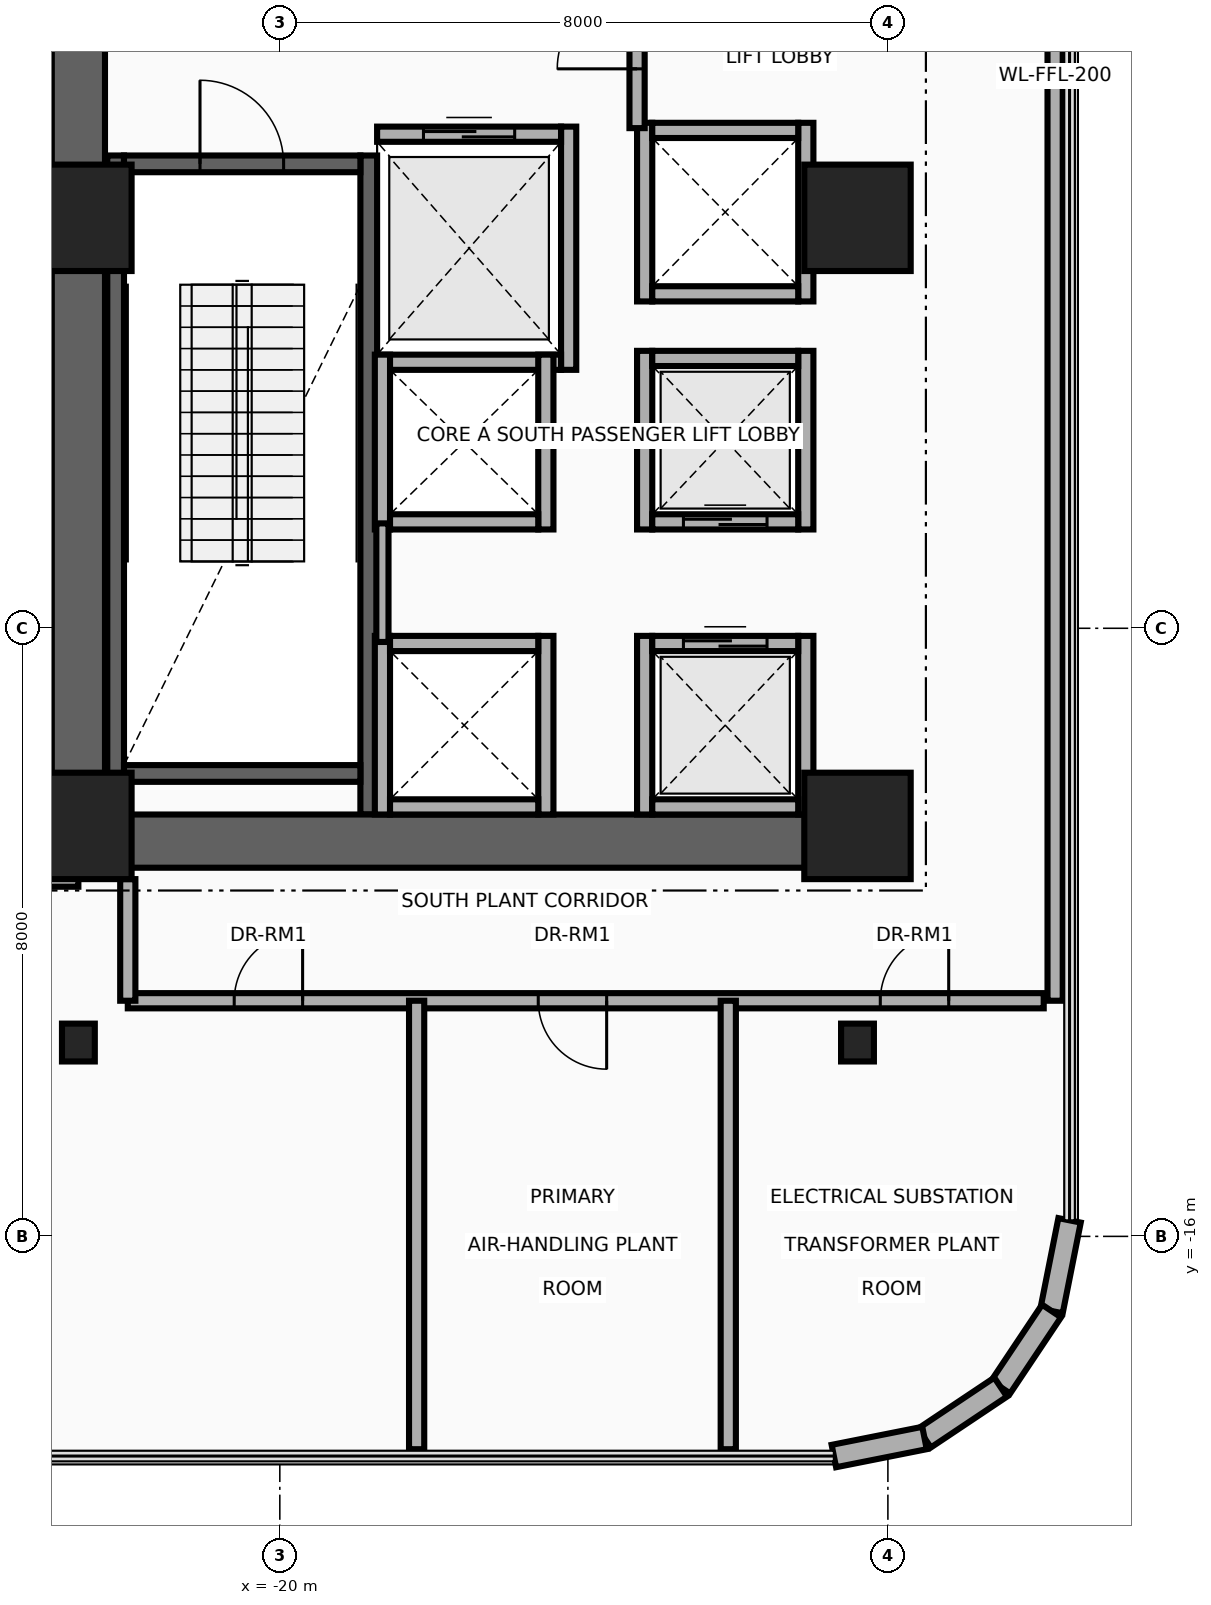
"""IFC4 building model, lengths in metres.
Left out: names, types, materials, properties, quantities, classifications, styles, units other than length and angle.
Written with IfcOpenShell. Run it as: python <this file> out.ifc"""

import sys

from ifc_helpers import new_model, si_unit, direction, frame, frame_2d, origin, origin_2d, place, context, subcontext, project, spatial, rectangle, i_section, extrude, source, transform, mapped, element, fill, save


model = new_model("IFC4")
c1 = context("Model", 3, precision=1e-05, world=origin(), true_north=direction((0.0, 1.0)))
c2 = subcontext(c1, "Body", "Model", "MODEL_VIEW")
j1 = project(units=[si_unit("LENGTHUNIT", "METRE"), si_unit("PLANEANGLEUNIT", "RADIAN")], contexts=[c1])
p1 = place(None, origin())
s1 = spatial("IfcSite", under=j1, at=p1, CompositionType="ELEMENT")
p2 = place(p1, origin())
s2 = spatial("IfcBuilding", under=s1, at=p2, CompositionType="ELEMENT")
p3 = place(p2, frame((0.0, 0.0, 96.3)))
s3 = spatial("IfcBuildingStorey", under=s2, at=p3, CompositionType="ELEMENT", Elevation=96.3)
for number, where, z_axis, x_axis in (
    (1, (-22.16, -10.45, 0.0), (0.0, 0.0, 1.0), (0.0, 1.0, 0.0)),
    (2, (-18.83, -10.45, 0.0), (0.0, 0.0, 1.0), (0.0, 1.0, 0.0)),
):
    element("IfcWall", number, at=place(p3, frame(where, z_axis=z_axis, x_axis=x_axis)), inside=s3, PredefinedType="SHEAR", context=c2, shape_type="SweptSolid", body=[
        extrude(rectangle(XDim=8.67, YDim=0.22, at=frame_2d((4.335, 0.0))), origin(), (0.0, 0.0, 1.0), 4.56),
    ])
p4 = place(p3, frame((-22.05, -9.91, 0.0), z_axis=(0.0, 0.0, 1.0), x_axis=(1.0, 0.0, 0.0)))
e3 = element("IfcWall", 3, at=p4, inside=s3, PredefinedType="SHEAR", context=c2, shape_type="SweptSolid", body=[
    extrude(rectangle(XDim=3.11, YDim=0.22, at=frame_2d((1.555, 0.0))), origin(), (0.0, 0.0, 1.0), 4.56),
])
p5 = place(p3, frame((-22.05, -1.89, 0.0), z_axis=(0.0, 0.0, 1.0), x_axis=(1.0, 0.0, 0.0)))
e4 = element("IfcWall", 4, at=p5, inside=s3, PredefinedType="SHEAR", context=c2, shape_type="SweptSolid", body=[
    extrude(rectangle(XDim=3.11, YDim=0.22, at=frame_2d((1.555, 0.0))), origin(), (0.0, 0.0, 1.0), 4.56),
])
p6 = place(p5, frame((1.0, 0.0, 0.0)))
e5 = element("IfcOpeningElement", 5, at=p6, cuts=e4, PredefinedType="OPENING", context=c2, shape_type="SweptSolid", body=[
    extrude(rectangle(XDim=1.1, YDim=2.15, at=frame_2d((0.55, 1.075))), frame((0.0, 0.125, 0.0), z_axis=(0.0, -1.0, 0.0), x_axis=(1.0, 0.0, 0.0)), (0.0, 0.0, 1.0), 0.25),
])
p7 = place(p3, frame((-22.65, -11.15, 0.0), z_axis=(0.0, 0.0, 1.0), x_axis=(0.0, 1.0, 0.0)))
e6 = element("IfcWall", 6, at=p7, inside=s3, PredefinedType="SHEAR", context=c2, shape_type="SweptSolid", body=[
    extrude(rectangle(XDim=22.3, YDim=0.7, at=frame_2d((11.15, 0.0))), origin(), (0.0, 0.0, 1.0), 4.56),
])
p8 = place(p3, frame((-22.65, -10.8, 0.0), z_axis=(0.0, 0.0, 1.0), x_axis=(1.0, 0.0, 0.0)))
e7 = element("IfcWall", 7, at=p8, inside=s3, PredefinedType="SHEAR", context=c2, shape_type="SweptSolid", body=[
    extrude(rectangle(XDim=10.25, YDim=0.7, at=frame_2d((5.125, 0.0))), origin(), (0.0, 0.0, 1.0), 4.56),
])
m1 = source(origin(), c2, "Body", "SweptSolid", [
    extrude(rectangle(XDim=1.4, YDim=1.4, at=origin_2d()), origin(), (0.0, 0.0, 1.0), 4.8),
])
for number, where, z_axis, x_axis in (
    (8, (-22.65, -10.6, 0.0), (0.0, 0.0, 1.0), (1.0, 0.0, 0.0)),
    (9, (-12.4, -10.6, 0.0), (0.0, 0.0, 1.0), (1.0, 0.0, 0.0)),
    (10, (-22.65, -2.6, 0.0), (0.0, 0.0, 1.0), (1.0, 0.0, 0.0)),
    (11, (-12.4, -2.6, 0.0), (0.0, 0.0, 1.0), (1.0, 0.0, 0.0)),
):
    element("IfcColumn", number, at=place(p3, frame(where, z_axis=z_axis, x_axis=x_axis)), inside=s3, PredefinedType="COLUMN", context=c2, shape_type="MappedRepresentation", body=[
        mapped(m1, transform((0.0, 0.0, 0.0), x_axis=(1.0, 0.0, 0.0), y_axis=(0.0, 1.0, 0.0), z_axis=(0.0, 0.0, 1.0), scale=1.0)),
    ])
m2 = source(origin(), c2, "Body", "SweptSolid", [
    extrude(i_section(OverallWidth=0.432, OverallDepth=0.498, WebThickness=0.056, FlangeThickness=0.089, at=origin_2d()), origin(), (0.0, 0.0, 1.0), 4.8),
])
for number, where, z_axis, x_axis in (
    (12, (-22.65, -13.45, 0.0), (0.0, 0.0, 1.0), (1.0, 0.0, 0.0)),
    (13, (-12.4, -13.45, 0.0), (0.0, 0.0, 1.0), (1.0, 0.0, 0.0)),
):
    element("IfcColumn", number, at=place(p3, frame(where, z_axis=z_axis, x_axis=x_axis)), inside=s3, PredefinedType="COLUMN", context=c2, shape_type="MappedRepresentation", body=[
        mapped(m2, transform((0.0, 0.0, 0.0), x_axis=(1.0, 0.0, 0.0), y_axis=(0.0, 1.0, 0.0), z_axis=(0.0, 0.0, 1.0), scale=1.0)),
    ])
p9 = place(p3, frame((-9.61, -15.789, 0.0), z_axis=(0.0, 0.0, 1.0), x_axis=(-0.194996050505, -0.980804027463, 0.0)))
e14 = element("IfcWall", 14, at=p9, inside=s3, PredefinedType="SOLIDWALL", context=c2, shape_type="SweptSolid", body=[
    extrude(rectangle(XDim=1.216, YDim=0.3, at=frame_2d((0.608, 0.0))), origin(), (0.0, 0.0, 1.0), 4.56),
])
for number, where, z_axis, x_axis in (
    (15, (-9.847, -16.982, 0.0), (0.0, 0.0, 1.0), (-0.556, -0.831, 0.0)),
    (16, (-10.517, -17.983, 0.0), (0.0, 0.0, 1.0), (-0.831, -0.556, 0.0)),
):
    element("IfcWall", number, at=place(p3, frame(where, z_axis=z_axis, x_axis=x_axis)), inside=s3, PredefinedType="SOLIDWALL", context=c2, shape_type="SweptSolid", body=[
        extrude(rectangle(XDim=1.205, YDim=0.3, at=frame_2d((0.603, 0.0))), origin(), (0.0, 0.0, 1.0), 4.56),
    ])
p10 = place(p3, frame((-11.518, -18.653, 0.0), z_axis=(0.0, 0.0, 1.0), x_axis=(-0.980804027463, -0.194996050505, 0.0)))
e17 = element("IfcWall", 17, at=p10, inside=s3, PredefinedType="SOLIDWALL", context=c2, shape_type="SweptSolid", body=[
    extrude(rectangle(XDim=1.216, YDim=0.3, at=frame_2d((0.608, 0.0))), origin(), (0.0, 0.0, 1.0), 4.56),
])
p11 = place(p3, frame((-16.2, -4.6, 0.0), z_axis=(0.0, 0.0, 1.0), x_axis=(0.0, 1.0, 0.0)))
e18 = element("IfcWall", 18, at=p11, inside=s3, PredefinedType="MOVABLE", context=c2, shape_type="SweptSolid", body=[
    extrude(rectangle(XDim=3.2, YDim=0.2, at=frame_2d((1.6, 0.0))), origin(), (0.0, 0.0, 1.0), 4.56),
])
p12 = place(p3, frame((-18.72, -4.5, 0.0), z_axis=(0.0, 0.0, 1.0), x_axis=(1.0, 0.0, 0.0)))
e19 = element("IfcWall", 19, at=p12, inside=s3, PredefinedType="MOVABLE", context=c2, shape_type="SweptSolid", body=[
    extrude(rectangle(XDim=2.42, YDim=0.2, at=frame_2d((1.21, 0.0))), origin(), (0.0, 0.0, 1.0), 4.56),
])
p13 = place(p3, frame((-18.72, -1.5, 0.0), z_axis=(0.0, 0.0, 1.0), x_axis=(1.0, 0.0, 0.0)))
e20 = element("IfcWall", 20, at=p13, inside=s3, PredefinedType="MOVABLE", context=c2, shape_type="SweptSolid", body=[
    extrude(rectangle(XDim=2.42, YDim=0.2, at=frame_2d((1.21, 0.0))), origin(), (0.0, 0.0, 1.0), 4.56),
])
p14 = place(p13, frame((0.61, 0.0, 0.0)))
e21 = element("IfcOpeningElement", 21, at=p14, cuts=e20, PredefinedType="OPENING", context=c2, shape_type="SweptSolid", body=[
    extrude(rectangle(XDim=1.2, YDim=2.1, at=frame_2d((0.6, 1.05))), frame((0.0, 0.115, 0.0), z_axis=(0.0, -1.0, 0.0), x_axis=(1.0, 0.0, 0.0)), (0.0, 0.0, 1.0), 0.23),
])
for number, where, z_axis, x_axis in (
    (22, (-15.2, -10.45, 0.0), (0.0, 0.0, 1.0), (0.0, 1.0, 0.0)),
    (23, (-13.08, -10.45, 0.0), (0.0, 0.0, 1.0), (0.0, 1.0, 0.0)),
):
    element("IfcWall", number, at=place(p3, frame(where, z_axis=z_axis, x_axis=x_axis)), inside=s3, PredefinedType="MOVABLE", context=c2, shape_type="SweptSolid", body=[
        extrude(rectangle(XDim=2.35, YDim=0.2, at=frame_2d((1.175, 0.0))), origin(), (0.0, 0.0, 1.0), 3.766),
    ])
p15 = place(p3, frame((-15.1, -10.35, 0.0), z_axis=(0.0, 0.0, 1.0), x_axis=(1.0, 0.0, 0.0)))
e24 = element("IfcWall", 24, at=p15, inside=s3, PredefinedType="MOVABLE", context=c2, shape_type="SweptSolid", body=[
    extrude(rectangle(XDim=1.92, YDim=0.2, at=frame_2d((0.96, 0.0))), origin(), (0.0, 0.0, 1.0), 3.766),
])
p16 = place(p3, frame((-15.1, -8.2, 0.0), z_axis=(0.0, 0.0, 1.0), x_axis=(1.0, 0.0, 0.0)))
e25 = element("IfcWall", 25, at=p16, inside=s3, PredefinedType="MOVABLE", context=c2, shape_type="SweptSolid", body=[
    extrude(rectangle(XDim=1.92, YDim=0.2, at=frame_2d((0.96, 0.0))), origin(), (0.0, 0.0, 1.0), 4.56),
])
p17 = place(p16, frame((0.41, 0.0, 0.0)))
e26 = element("IfcOpeningElement", 26, at=p17, cuts=e25, PredefinedType="OPENING", context=c2, shape_type="SweptSolid", body=[
    extrude(rectangle(XDim=1.1, YDim=2.1, at=frame_2d((0.55, 1.05))), frame((0.0, 0.115, 0.0), z_axis=(0.0, -1.0, 0.0), x_axis=(1.0, 0.0, 0.0)), (0.0, 0.0, 1.0), 0.23),
])
for number, where, z_axis, x_axis in (
    (27, (-15.2, -6.7, 0.0), (0.0, 0.0, 1.0), (0.0, 1.0, 0.0)),
    (28, (-13.08, -6.7, 0.0), (0.0, 0.0, 1.0), (0.0, 1.0, 0.0)),
):
    element("IfcWall", number, at=place(p3, frame(where, z_axis=z_axis, x_axis=x_axis)), inside=s3, PredefinedType="MOVABLE", context=c2, shape_type="SweptSolid", body=[
        extrude(rectangle(XDim=2.35, YDim=0.2, at=frame_2d((1.175, 0.0))), origin(), (0.0, 0.0, 1.0), 4.56),
    ])
p18 = place(p3, frame((-15.1, -6.6, 0.0), z_axis=(0.0, 0.0, 1.0), x_axis=(1.0, 0.0, 0.0)))
e29 = element("IfcWall", 29, at=p18, inside=s3, PredefinedType="MOVABLE", context=c2, shape_type="SweptSolid", body=[
    extrude(rectangle(XDim=1.92, YDim=0.2, at=frame_2d((0.96, 0.0))), origin(), (0.0, 0.0, 1.0), 4.56),
])
p19 = place(p18, frame((0.41, 0.0, 0.0)))
e30 = element("IfcOpeningElement", 30, at=p19, cuts=e29, PredefinedType="OPENING", context=c2, shape_type="SweptSolid", body=[
    extrude(rectangle(XDim=1.1, YDim=2.1, at=frame_2d((0.55, 1.05))), frame((0.0, 0.115, 0.0), z_axis=(0.0, -1.0, 0.0), x_axis=(1.0, 0.0, 0.0)), (0.0, 0.0, 1.0), 0.23),
])
p20 = place(p3, frame((-15.1, -4.45, 0.0), z_axis=(0.0, 0.0, 1.0), x_axis=(1.0, 0.0, 0.0)))
e31 = element("IfcWall", 31, at=p20, inside=s3, PredefinedType="MOVABLE", context=c2, shape_type="SweptSolid", body=[
    extrude(rectangle(XDim=1.92, YDim=0.2, at=frame_2d((0.96, 0.0))), origin(), (0.0, 0.0, 1.0), 4.56),
])
for number, where, z_axis, x_axis in (
    (32, (-18.65, -10.45, 0.0), (0.0, 0.0, 1.0), (0.0, 1.0, 0.0)),
    (33, (-16.5, -10.45, 0.0), (0.0, 0.0, 1.0), (0.0, 1.0, 0.0)),
):
    element("IfcWall", number, at=place(p3, frame(where, z_axis=z_axis, x_axis=x_axis)), inside=s3, PredefinedType="MOVABLE", context=c2, shape_type="SweptSolid", body=[
        extrude(rectangle(XDim=2.35, YDim=0.2, at=frame_2d((1.175, 0.0))), origin(), (0.0, 0.0, 1.0), 3.766),
    ])
p21 = place(p3, frame((-18.55, -10.35, 0.0), z_axis=(0.0, 0.0, 1.0), x_axis=(1.0, 0.0, 0.0)))
e34 = element("IfcWall", 34, at=p21, inside=s3, PredefinedType="MOVABLE", context=c2, shape_type="SweptSolid", body=[
    extrude(rectangle(XDim=1.95, YDim=0.2, at=frame_2d((0.975, 0.0))), origin(), (0.0, 0.0, 1.0), 3.766),
])
p22 = place(p3, frame((-18.55, -8.2, 0.0), z_axis=(0.0, 0.0, 1.0), x_axis=(1.0, 0.0, 0.0)))
e35 = element("IfcWall", 35, at=p22, inside=s3, PredefinedType="MOVABLE", context=c2, shape_type="SweptSolid", body=[
    extrude(rectangle(XDim=1.95, YDim=0.2, at=frame_2d((0.975, 0.0))), origin(), (0.0, 0.0, 1.0), 4.56),
])
for number, where, z_axis, x_axis in (
    (36, (-18.65, -6.7, 0.0), (0.0, 0.0, 1.0), (0.0, 1.0, 0.0)),
    (37, (-16.5, -6.7, 0.0), (0.0, 0.0, 1.0), (0.0, 1.0, 0.0)),
):
    element("IfcWall", number, at=place(p3, frame(where, z_axis=z_axis, x_axis=x_axis)), inside=s3, PredefinedType="MOVABLE", context=c2, shape_type="SweptSolid", body=[
        extrude(rectangle(XDim=2.3, YDim=0.2, at=frame_2d((1.15, 0.0))), origin(), (0.0, 0.0, 1.0), 4.56),
    ])
p23 = place(p3, frame((-18.55, -6.6, 0.0), z_axis=(0.0, 0.0, 1.0), x_axis=(1.0, 0.0, 0.0)))
e38 = element("IfcWall", 38, at=p23, inside=s3, PredefinedType="MOVABLE", context=c2, shape_type="SweptSolid", body=[
    extrude(rectangle(XDim=1.95, YDim=0.2, at=frame_2d((0.975, 0.0))), origin(), (0.0, 0.0, 1.0), 4.56),
])
for number, where, z_axis, x_axis in (
    (39, (-15.2, -3.7, 0.0), (0.0, 0.0, 1.0), (0.0, 1.0, 0.0)),
    (40, (-13.08, -3.7, 0.0), (0.0, 0.0, 1.0), (0.0, 1.0, 0.0)),
):
    element("IfcWall", number, at=place(p3, frame(where, z_axis=z_axis, x_axis=x_axis)), inside=s3, PredefinedType="MOVABLE", context=c2, shape_type="SweptSolid", body=[
        extrude(rectangle(XDim=2.35, YDim=0.2, at=frame_2d((1.175, 0.0))), origin(), (0.0, 0.0, 1.0), 4.56),
    ])
for number, where, z_axis, x_axis in (
    (41, (-15.1, -3.6, 0.0), (0.0, 0.0, 1.0), (1.0, 0.0, 0.0)),
    (42, (-15.1, -1.45, 0.0), (0.0, 0.0, 1.0), (1.0, 0.0, 0.0)),
):
    element("IfcWall", number, at=place(p3, frame(where, z_axis=z_axis, x_axis=x_axis)), inside=s3, PredefinedType="MOVABLE", context=c2, shape_type="SweptSolid", body=[
        extrude(rectangle(XDim=1.92, YDim=0.2, at=frame_2d((0.96, 0.0))), origin(), (0.0, 0.0, 1.0), 4.56),
    ])
p24 = place(p3, frame((-15.3, -1.42, 0.0), z_axis=(0.0, 0.0, 1.0), x_axis=(0.0, 1.0, 0.0)))
e43 = element("IfcWall", 43, at=p24, inside=s3, PredefinedType="PARTITIONING", context=c2, shape_type="SweptSolid", body=[
    extrude(rectangle(XDim=2.67, YDim=0.2, at=frame_2d((1.335, 0.0))), origin(), (0.0, 0.0, 1.0), 4.56),
])
p25 = place(p24, frame((0.78, 0.0, 0.0)))
e44 = element("IfcOpeningElement", 44, at=p25, cuts=e43, PredefinedType="OPENING", context=c2, shape_type="SweptSolid", body=[
    extrude(rectangle(XDim=1.05, YDim=2.15, at=frame_2d((0.525, 1.075))), frame((0.0, 0.115, 0.0), z_axis=(0.0, -1.0, 0.0), x_axis=(1.0, 0.0, 0.0)), (0.0, 0.0, 1.0), 0.23),
])
p26 = place(p3, frame((-18.65, -8.18, 0.0), z_axis=(0.0, 0.0, 1.0), x_axis=(0.0, 1.0, 0.0)))
e45 = element("IfcWall", 45, at=p26, inside=s3, PredefinedType="PARTITIONING", context=c2, shape_type="SweptSolid", body=[
    extrude(rectangle(XDim=1.56, YDim=0.16, at=frame_2d((0.78, 0.0))), origin(), (0.0, 0.0, 1.0), 4.56),
])
p27 = place(p3, frame((-31.89, -11.3, 0.0), z_axis=(0.0, 0.0, 1.0), x_axis=(1.0, 0.0, 0.0)))
e46 = element("IfcWall", 46, at=p27, inside=s3, PredefinedType="PARTITIONING", context=c2, shape_type="SweptSolid", body=[
    extrude(rectangle(XDim=9.24, YDim=0.2, at=frame_2d((4.62, 0.0))), origin(), (0.0, 0.0, 1.0), 3.934),
])
p28 = place(p3, frame((-22.0, -12.9, 0.0), z_axis=(0.0, 0.0, 1.0), x_axis=(1.0, 0.0, 0.0)))
e47 = element("IfcWall", 47, at=p28, inside=s3, PredefinedType="PARTITIONING", context=c2, shape_type="SweptSolid", body=[
    extrude(rectangle(XDim=12.05, YDim=0.2, at=frame_2d((6.025, 0.0))), origin(), (0.0, 0.0, 1.0), 3.934),
])
p29 = place(p28, frame((1.4, 0.0, 0.0)))
e48 = element("IfcOpeningElement", 48, at=p29, cuts=e47, PredefinedType="OPENING", context=c2, shape_type="SweptSolid", body=[
    extrude(rectangle(XDim=0.9, YDim=2.1, at=frame_2d((0.45, 1.05))), frame((0.0, 0.115, 0.0), z_axis=(0.0, -1.0, 0.0), x_axis=(1.0, 0.0, 0.0)), (0.0, 0.0, 1.0), 0.23),
])
p30 = place(p28, frame((5.4, 0.0, 0.0)))
e49 = element("IfcOpeningElement", 49, at=p30, cuts=e47, PredefinedType="OPENING", context=c2, shape_type="SweptSolid", body=[
    extrude(rectangle(XDim=0.9, YDim=2.1, at=frame_2d((0.45, 1.05))), frame((0.0, 0.115, 0.0), z_axis=(0.0, -1.0, 0.0), x_axis=(1.0, 0.0, 0.0)), (0.0, 0.0, 1.0), 0.23),
])
p31 = place(p28, frame((9.9, 0.0, 0.0)))
e50 = element("IfcOpeningElement", 50, at=p31, cuts=e47, PredefinedType="OPENING", context=c2, shape_type="SweptSolid", body=[
    extrude(rectangle(XDim=0.9, YDim=2.1, at=frame_2d((0.45, 1.05))), frame((0.0, 0.115, 0.0), z_axis=(0.0, -1.0, 0.0), x_axis=(1.0, 0.0, 0.0)), (0.0, 0.0, 1.0), 0.23),
])
for number, where, z_axis, x_axis in (
    (51, (-18.2, -18.8, 0.0), (0.0, 0.0, 1.0), (0.0, 1.0, 0.0)),
    (52, (-14.1, -18.8, 0.0), (0.0, 0.0, 1.0), (0.0, 1.0, 0.0)),
):
    element("IfcWall", number, at=place(p3, frame(where, z_axis=z_axis, x_axis=x_axis)), inside=s3, PredefinedType="PARTITIONING", context=c2, shape_type="SweptSolid", body=[
        extrude(rectangle(XDim=5.9, YDim=0.2, at=frame_2d((2.95, 0.0))), origin(), (0.0, 0.0, 1.0), 3.996),
    ])
p32 = place(p3, frame((-22.0, -12.9, 0.0), z_axis=(0.0, 0.0, 1.0), x_axis=(0.0, 1.0, 0.0)))
e53 = element("IfcWall", 53, at=p32, inside=s3, PredefinedType="PARTITIONING", context=c2, shape_type="SweptSolid", body=[
    extrude(rectangle(XDim=1.6, YDim=0.2, at=frame_2d((0.8, 0.0))), origin(), (0.0, 0.0, 1.0), 4.088),
])
p33 = place(p3, frame((-9.8, -12.9, 0.0), z_axis=(0.0, 0.0, 1.0), x_axis=(0.0, 1.0, 0.0)))
e54 = element("IfcWall", 54, at=p33, inside=s3, PredefinedType="PARTITIONING", context=c2, shape_type="SweptSolid", body=[
    extrude(rectangle(XDim=24.32, YDim=0.2, at=frame_2d((12.16, 0.0))), origin(), (0.0, 0.0, 1.0), 3.766),
])
p34 = place(p14, origin())
e55 = element("IfcDoor", 55, at=p34, inside=s3, OperationType="DOUBLE_DOOR_SLIDING", PredefinedType="DOOR", context=c2, shape_type="SweptSolid", body=[
    extrude(rectangle(XDim=1.2, YDim=2.1, at=frame_2d((0.6, 1.05))), frame((0.0, 0.025, 0.0), z_axis=(0.0, -1.0, 0.0), x_axis=(1.0, 0.0, 0.0)), (0.0, 0.0, 1.0), 0.05),
])
fill(e21, e55)
p35 = place(p17, origin())
e56 = element("IfcDoor", 56, at=p35, inside=s3, OperationType="DOUBLE_DOOR_SLIDING", PredefinedType="DOOR", context=c2, shape_type="SweptSolid", body=[
    extrude(rectangle(XDim=1.1, YDim=2.1, at=frame_2d((0.55, 1.05))), frame((0.0, 0.025, 0.0), z_axis=(0.0, -1.0, 0.0), x_axis=(1.0, 0.0, 0.0)), (0.0, 0.0, 1.0), 0.05),
])
fill(e26, e56)
p36 = place(p19, origin())
e57 = element("IfcDoor", 57, at=p36, inside=s3, OperationType="DOUBLE_DOOR_SLIDING", PredefinedType="DOOR", context=c2, shape_type="SweptSolid", body=[
    extrude(rectangle(XDim=1.1, YDim=2.1, at=frame_2d((0.55, 1.05))), frame((0.0, 0.025, 0.0), z_axis=(0.0, -1.0, 0.0), x_axis=(1.0, 0.0, 0.0)), (0.0, 0.0, 1.0), 0.05),
])
fill(e30, e57)
p37 = place(p25, origin())
e58 = element("IfcDoor", 58, at=p37, inside=s3, OperationType="SINGLE_SWING_RIGHT", PredefinedType="DOOR", context=c2, shape_type="SweptSolid", body=[
    extrude(rectangle(XDim=1.05, YDim=2.15, at=frame_2d((0.525, 1.075))), frame((0.0, 0.025, 0.0), z_axis=(0.0, -1.0, 0.0), x_axis=(1.0, 0.0, 0.0)), (0.0, 0.0, 1.0), 0.05),
])
fill(e44, e58)
p38 = place(p6, origin())
e59 = element("IfcDoor", 59, at=p38, inside=s3, OperationType="SINGLE_SWING_RIGHT", PredefinedType="DOOR", context=c2, shape_type="SweptSolid", body=[
    extrude(rectangle(XDim=1.1, YDim=2.15, at=frame_2d((0.55, 1.075))), frame((0.0, 0.025, 0.0), z_axis=(0.0, -1.0, 0.0), x_axis=(1.0, 0.0, 0.0)), (0.0, 0.0, 1.0), 0.05),
])
fill(e5, e59)
p39 = place(p29, origin())
e60 = element("IfcDoor", 60, at=p39, inside=s3, OperationType="SINGLE_SWING_RIGHT", PredefinedType="DOOR", context=c2, shape_type="SweptSolid", body=[
    extrude(rectangle(XDim=0.9, YDim=2.1, at=frame_2d((0.45, 1.05))), frame((0.0, 0.025, 0.0), z_axis=(0.0, -1.0, 0.0), x_axis=(1.0, 0.0, 0.0)), (0.0, 0.0, 1.0), 0.05),
])
fill(e48, e60)
p40 = place(p30, frame((0.9, 0.0, 0.0), z_axis=(0.0, 0.0, 1.0), x_axis=(-1.0, 0.0, 0.0)))
e61 = element("IfcDoor", 61, at=p40, inside=s3, OperationType="SINGLE_SWING_LEFT", PredefinedType="DOOR", context=c2, shape_type="SweptSolid", body=[
    extrude(rectangle(XDim=0.9, YDim=2.1, at=frame_2d((0.45, 1.05))), frame((0.0, 0.025, 0.0), z_axis=(0.0, -1.0, 0.0), x_axis=(1.0, 0.0, 0.0)), (0.0, 0.0, 1.0), 0.05),
])
fill(e49, e61)
p41 = place(p31, origin())
e62 = element("IfcDoor", 62, at=p41, inside=s3, OperationType="SINGLE_SWING_RIGHT", PredefinedType="DOOR", context=c2, shape_type="SweptSolid", body=[
    extrude(rectangle(XDim=0.9, YDim=2.1, at=frame_2d((0.45, 1.05))), frame((0.0, 0.025, 0.0), z_axis=(0.0, -1.0, 0.0), x_axis=(1.0, 0.0, 0.0)), (0.0, 0.0, 1.0), 0.05),
])
fill(e50, e62)
save(model, sys.argv[1])
